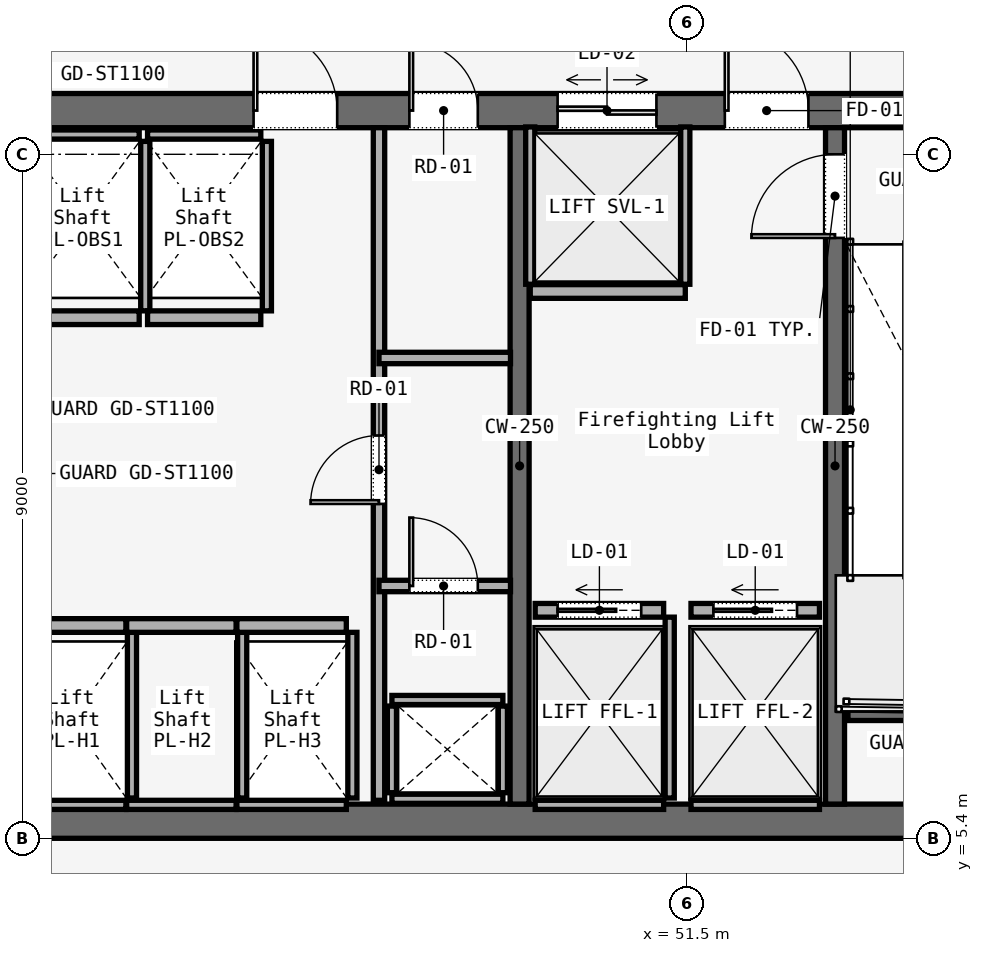
"""IFC4 building model, lengths in metres.
Left out: names, types, materials, properties, quantities, classifications, styles, units other than length and angle.
Written with IfcOpenShell. Run it as: python <this file> out.ifc"""

import sys

from ifc_helpers import new_model, si_unit, direction, frame, frame_2d, origin, place, context, subcontext, project, spatial, rectangle, extrude, element, fill, save


model = new_model("IFC4")
c1 = context("Model", 3, precision=1e-05, world=origin(), true_north=direction((0.0, 1.0)))
c2 = subcontext(c1, "Body", "Model", "MODEL_VIEW")
j1 = project(units=[si_unit("LENGTHUNIT", "METRE"), si_unit("PLANEANGLEUNIT", "RADIAN")], contexts=[c1])
p1 = place(None, origin())
s1 = spatial("IfcSite", under=j1, at=p1, CompositionType="ELEMENT")
p2 = place(p1, origin())
s2 = spatial("IfcBuilding", under=s1, at=p2, CompositionType="ELEMENT")
p3 = place(p2, frame((0.0, 0.0, 18.0)))
s3 = spatial("IfcBuildingStorey", under=s2, at=p3, CompositionType="ELEMENT", Elevation=18.0)
p4 = place(p3, frame((26.45, 14.975, 0.0), z_axis=(0.0, 0.0, 1.0), x_axis=(1.0, 0.0, 0.0)))
e1 = element("IfcWall", 1, at=p4, inside=s3, PredefinedType="SOLIDWALL", context=c2, shape_type="SweptSolid", body=[
    extrude(rectangle(XDim=31.1, YDim=0.45, at=frame_2d((15.55, 0.0))), origin(), (0.0, 0.0, 1.0), 5.7),
])
p5 = place(p4, frame((1.65, 0.0, 0.0)))
e2 = element("IfcOpeningElement", 2, at=p5, cuts=e1, PredefinedType="OPENING", context=c2, shape_type="SweptSolid", body=[
    extrude(rectangle(XDim=1.1, YDim=2.2, at=frame_2d((0.55, 1.1))), frame((0.0, 0.225, 0.0), z_axis=(0.0, -1.0, 0.0), x_axis=(1.0, 0.0, 0.0)), (0.0, 0.0, 1.0), 0.45),
])
p6 = place(p4, frame((13.65, 0.0, 0.0)))
e3 = element("IfcOpeningElement", 3, at=p6, cuts=e1, PredefinedType="OPENING", context=c2, shape_type="SweptSolid", body=[
    extrude(rectangle(XDim=1.1, YDim=2.2, at=frame_2d((0.55, 1.1))), frame((0.0, 0.225, 0.0), z_axis=(0.0, -1.0, 0.0), x_axis=(1.0, 0.0, 0.0)), (0.0, 0.0, 1.0), 0.45),
])
p7 = place(p4, frame((25.55, 0.0, 0.0)))
e4 = element("IfcOpeningElement", 4, at=p7, cuts=e1, PredefinedType="OPENING", context=c2, shape_type="SweptSolid", body=[
    extrude(rectangle(XDim=1.1, YDim=2.2, at=frame_2d((0.55, 1.1))), frame((0.0, 0.225, 0.0), z_axis=(0.0, -1.0, 0.0), x_axis=(1.0, 0.0, 0.0)), (0.0, 0.0, 1.0), 0.45),
])
p8 = place(p4, frame((10.7, 0.0, 0.0)))
e5 = element("IfcOpeningElement", 5, at=p8, cuts=e1, PredefinedType="OPENING", context=c2, shape_type="SweptSolid", body=[
    extrude(rectangle(XDim=1.4, YDim=2.2, at=frame_2d((0.7, 1.1))), frame((0.0, 0.225, 0.0), z_axis=(0.0, -1.0, 0.0), x_axis=(1.0, 0.0, 0.0)), (0.0, 0.0, 1.0), 0.45),
])
p9 = place(p4, frame((19.35, 0.0, 0.0)))
e6 = element("IfcOpeningElement", 6, at=p9, cuts=e1, PredefinedType="OPENING", context=c2, shape_type="SweptSolid", body=[
    extrude(rectangle(XDim=1.1, YDim=2.2, at=frame_2d((0.55, 1.1))), frame((0.0, 0.225, 0.0), z_axis=(0.0, -1.0, 0.0), x_axis=(1.0, 0.0, 0.0)), (0.0, 0.0, 1.0), 0.45),
])
p10 = place(p4, frame((21.4, 0.0, 0.0)))
e7 = element("IfcOpeningElement", 7, at=p10, cuts=e1, PredefinedType="OPENING", context=c2, shape_type="SweptSolid", body=[
    extrude(rectangle(XDim=0.9, YDim=2.1, at=frame_2d((0.45, 1.05))), frame((0.0, 0.225, 0.0), z_axis=(0.0, -1.0, 0.0), x_axis=(1.0, 0.0, 0.0)), (0.0, 0.0, 1.0), 0.45),
])
p11 = place(p4, frame((23.35, 0.0, 0.0)))
e8 = element("IfcOpeningElement", 8, at=p11, cuts=e1, PredefinedType="OPENING", context=c2, shape_type="SweptSolid", body=[
    extrude(rectangle(XDim=1.3, YDim=2.3, at=frame_2d((0.65, 1.15))), frame((0.0, 0.225, 0.0), z_axis=(0.0, -1.0, 0.0), x_axis=(1.0, 0.0, 0.0)), (0.0, 0.0, 1.0), 0.45),
])
p12 = place(p3, frame((26.45, 5.625, 0.0), z_axis=(0.0, 0.0, 1.0), x_axis=(1.0, 0.0, 0.0)))
e9 = element("IfcWall", 9, at=p12, inside=s3, PredefinedType="SOLIDWALL", context=c2, shape_type="SweptSolid", body=[
    extrude(rectangle(XDim=31.1, YDim=0.45, at=frame_2d((15.55, 0.0))), origin(), (0.0, 0.0, 1.0), 5.7),
])
p13 = place(p3, frame((49.3, 5.85, 0.0), z_axis=(0.0, 0.0, 1.0), x_axis=(0.0, 1.0, 0.0)))
e10 = element("IfcWall", 10, at=p13, inside=s3, PredefinedType="SOLIDWALL", context=c2, shape_type="SweptSolid", body=[
    extrude(rectangle(XDim=8.9, YDim=0.25, at=frame_2d((4.45, 0.0))), origin(), (0.0, 0.0, 1.0), 5.7),
])
p14 = place(p3, frame((53.45, 5.85, 0.0), z_axis=(0.0, 0.0, 1.0), x_axis=(0.0, 1.0, 0.0)))
e11 = element("IfcWall", 11, at=p14, inside=s3, PredefinedType="SOLIDWALL", context=c2, shape_type="SweptSolid", body=[
    extrude(rectangle(XDim=8.9, YDim=0.25, at=frame_2d((4.45, 0.0))), origin(), (0.0, 0.0, 1.0), 5.7),
])
p15 = place(p14, frame((7.45, 0.0, 0.0)))
e12 = element("IfcOpeningElement", 12, at=p15, cuts=e11, PredefinedType="OPENING", context=c2, shape_type="SweptSolid", body=[
    extrude(rectangle(XDim=1.1, YDim=2.2, at=frame_2d((0.55, 1.1))), frame((0.0, 0.125, 0.0), z_axis=(0.0, -1.0, 0.0), x_axis=(1.0, 0.0, 0.0)), (0.0, 0.0, 1.0), 0.25),
])
p16 = place(p3, frame((53.62, 7.05, 0.0), z_axis=(0.0, 0.0, 1.0), x_axis=(1.0, 0.0, 0.0)))
e13 = element("IfcWall", 13, at=p16, inside=s3, PredefinedType="SOLIDWALL", context=c2, shape_type="SweptSolid", body=[
    extrude(rectangle(XDim=3.115, YDim=0.2, at=frame_2d((1.558, 0.0))), origin(), (0.0, 0.0, 1.0), 6.0),
])
for number, where, z_axis, x_axis in (
    (14, (47.62, 5.92, 0.0), (0.0, 0.0, 1.0), (1.0, 0.0, 0.0)),
    (15, (47.62, 7.22, 0.0), (0.0, 0.0, 1.0), (1.0, 0.0, 0.0)),
):
    element("IfcWall", number, at=place(p3, frame(where, z_axis=z_axis, x_axis=x_axis)), inside=s3, PredefinedType="SOLIDWALL", context=c2, shape_type="SweptSolid", body=[
        extrude(rectangle(XDim=1.46, YDim=0.12, at=frame_2d((0.73, 0.0))), origin(), (0.0, 0.0, 1.0), 4.47),
    ])
for number, where, z_axis, x_axis in (
    (16, (47.62, 6.0, 0.0), (0.0, 0.0, 1.0), (0.0, 1.0, 0.0)),
    (17, (49.08, 6.0, 0.0), (0.0, 0.0, 1.0), (0.0, 1.0, 0.0)),
):
    element("IfcWall", number, at=place(p3, frame(where, z_axis=z_axis, x_axis=x_axis)), inside=s3, PredefinedType="SOLIDWALL", context=c2, shape_type="SweptSolid", body=[
        extrude(rectangle(XDim=1.14, YDim=0.12, at=frame_2d((0.57, 0.0))), origin(), (0.0, 0.0, 1.0), 4.47),
    ])
p17 = place(p3, frame((47.45, 5.9, 0.0), z_axis=(0.0, 0.0, 1.0), x_axis=(0.0, 1.0, 0.0)))
e18 = element("IfcWall", 18, at=p17, inside=s3, PredefinedType="PARTITIONING", context=c2, shape_type="SweptSolid", body=[
    extrude(rectangle(XDim=8.85, YDim=0.15, at=frame_2d((4.425, 0.0))), origin(), (0.0, 0.0, 1.0), 4.47),
])
p18 = place(p17, frame((3.9, 0.0, 0.0)))
e19 = element("IfcOpeningElement", 19, at=p18, cuts=e18, PredefinedType="OPENING", context=c2, shape_type="SweptSolid", body=[
    extrude(rectangle(XDim=0.9, YDim=2.1, at=frame_2d((0.45, 1.05))), frame((0.0, 0.075, 0.0), z_axis=(0.0, -1.0, 0.0), x_axis=(1.0, 0.0, 0.0)), (0.0, 0.0, 1.0), 0.15),
])
p19 = place(p3, frame((47.45, 8.72, 0.0), z_axis=(0.0, 0.0, 1.0), x_axis=(1.0, 0.0, 0.0)))
e20 = element("IfcWall", 20, at=p19, inside=s3, PredefinedType="PARTITIONING", context=c2, shape_type="SweptSolid", body=[
    extrude(rectangle(XDim=1.73, YDim=0.15, at=frame_2d((0.865, 0.0))), origin(), (0.0, 0.0, 1.0), 4.47),
])
p20 = place(p19, frame((0.4, 0.0, 0.0)))
e21 = element("IfcOpeningElement", 21, at=p20, cuts=e20, PredefinedType="OPENING", context=c2, shape_type="SweptSolid", body=[
    extrude(rectangle(XDim=0.9, YDim=2.1, at=frame_2d((0.45, 1.05))), frame((0.0, 0.075, 0.0), z_axis=(0.0, -1.0, 0.0), x_axis=(1.0, 0.0, 0.0)), (0.0, 0.0, 1.0), 0.15),
])
p21 = place(p3, frame((47.45, 11.72, 0.0), z_axis=(0.0, 0.0, 1.0), x_axis=(1.0, 0.0, 0.0)))
e22 = element("IfcWall", 22, at=p21, inside=s3, PredefinedType="PARTITIONING", context=c2, shape_type="SweptSolid", body=[
    extrude(rectangle(XDim=1.73, YDim=0.15, at=frame_2d((0.865, 0.0))), origin(), (0.0, 0.0, 1.0), 4.47),
])
p22 = place(p3, frame((42.78, 8.2, 0.0), z_axis=(0.0, 0.0, 1.0), x_axis=(1.0, 0.0, 0.0)))
e23 = element("IfcWall", 23, at=p22, inside=s3, PredefinedType="SOLIDWALL", context=c2, shape_type="SweptSolid", body=[
    extrude(rectangle(XDim=1.34, YDim=0.18, at=frame_2d((0.67, 0.0))), origin(), (0.0, 0.0, 1.0), 4.47),
])
p23 = place(p3, frame((42.78, 5.84, 0.0), z_axis=(0.0, 0.0, 1.0), x_axis=(1.0, 0.0, 0.0)))
e24 = element("IfcWall", 24, at=p23, inside=s3, PredefinedType="SOLIDWALL", context=c2, shape_type="SweptSolid", body=[
    extrude(rectangle(XDim=1.34, YDim=0.12, at=frame_2d((0.67, 0.0))), origin(), (0.0, 0.0, 1.0), 4.47),
])
p24 = place(p3, frame((44.2, 5.93, 0.0), z_axis=(0.0, 0.0, 1.0), x_axis=(0.0, 1.0, 0.0)))
e25 = element("IfcWall", 25, at=p24, inside=s3, PredefinedType="SOLIDWALL", context=c2, shape_type="SweptSolid", body=[
    extrude(rectangle(XDim=2.18, YDim=0.12, at=frame_2d((1.09, 0.0))), origin(), (0.0, 0.0, 1.0), 4.47),
])
p25 = place(p3, frame((44.13, 8.2, 0.0), z_axis=(0.0, 0.0, 1.0), x_axis=(1.0, 0.0, 0.0)))
e26 = element("IfcWall", 26, at=p25, inside=s3, PredefinedType="SOLIDWALL", context=c2, shape_type="SweptSolid", body=[
    extrude(rectangle(XDim=1.44, YDim=0.18, at=frame_2d((0.72, 0.0))), origin(), (0.0, 0.0, 1.0), 4.47),
])
p26 = place(p3, frame((44.13, 5.84, 0.0), z_axis=(0.0, 0.0, 1.0), x_axis=(1.0, 0.0, 0.0)))
e27 = element("IfcWall", 27, at=p26, inside=s3, PredefinedType="SOLIDWALL", context=c2, shape_type="SweptSolid", body=[
    extrude(rectangle(XDim=1.44, YDim=0.12, at=frame_2d((0.72, 0.0))), origin(), (0.0, 0.0, 1.0), 4.47),
])
p27 = place(p3, frame((45.65, 5.93, 0.0), z_axis=(0.0, 0.0, 1.0), x_axis=(0.0, 1.0, 0.0)))
e28 = element("IfcWall", 28, at=p27, inside=s3, PredefinedType="SOLIDWALL", context=c2, shape_type="SweptSolid", body=[
    extrude(rectangle(XDim=2.18, YDim=0.12, at=frame_2d((1.09, 0.0))), origin(), (0.0, 0.0, 1.0), 4.47),
])
p28 = place(p3, frame((45.58, 8.2, 0.0), z_axis=(0.0, 0.0, 1.0), x_axis=(1.0, 0.0, 0.0)))
e29 = element("IfcWall", 29, at=p28, inside=s3, PredefinedType="SOLIDWALL", context=c2, shape_type="SweptSolid", body=[
    extrude(rectangle(XDim=1.44, YDim=0.18, at=frame_2d((0.72, 0.0))), origin(), (0.0, 0.0, 1.0), 4.47),
])
p29 = place(p3, frame((45.58, 5.84, 0.0), z_axis=(0.0, 0.0, 1.0), x_axis=(1.0, 0.0, 0.0)))
e30 = element("IfcWall", 30, at=p29, inside=s3, PredefinedType="SOLIDWALL", context=c2, shape_type="SweptSolid", body=[
    extrude(rectangle(XDim=1.44, YDim=0.12, at=frame_2d((0.72, 0.0))), origin(), (0.0, 0.0, 1.0), 4.47),
])
p30 = place(p3, frame((47.1, 5.93, 0.0), z_axis=(0.0, 0.0, 1.0), x_axis=(0.0, 1.0, 0.0)))
e31 = element("IfcWall", 31, at=p30, inside=s3, PredefinedType="SOLIDWALL", context=c2, shape_type="SweptSolid", body=[
    extrude(rectangle(XDim=2.18, YDim=0.12, at=frame_2d((1.09, 0.0))), origin(), (0.0, 0.0, 1.0), 4.47),
])
p31 = place(p3, frame((42.805, 12.25, 0.0), z_axis=(0.0, 0.0, 1.0), x_axis=(1.0, 0.0, 0.0)))
e32 = element("IfcWall", 32, at=p31, inside=s3, PredefinedType="SOLIDWALL", context=c2, shape_type="SweptSolid", body=[
    extrude(rectangle(XDim=1.49, YDim=0.18, at=frame_2d((0.745, 0.0))), origin(), (0.0, 0.0, 1.0), 4.47),
])
p32 = place(p3, frame((42.805, 14.66, 0.0), z_axis=(0.0, 0.0, 1.0), x_axis=(1.0, 0.0, 0.0)))
e33 = element("IfcWall", 33, at=p32, inside=s3, PredefinedType="SOLIDWALL", context=c2, shape_type="SweptSolid", body=[
    extrude(rectangle(XDim=1.49, YDim=0.12, at=frame_2d((0.745, 0.0))), origin(), (0.0, 0.0, 1.0), 4.47),
])
p33 = place(p3, frame((44.375, 12.34, 0.0), z_axis=(0.0, 0.0, 1.0), x_axis=(0.0, 1.0, 0.0)))
e34 = element("IfcWall", 34, at=p33, inside=s3, PredefinedType="SOLIDWALL", context=c2, shape_type="SweptSolid", body=[
    extrude(rectangle(XDim=2.23, YDim=0.12, at=frame_2d((1.115, 0.0))), origin(), (0.0, 0.0, 1.0), 4.47),
])
p34 = place(p3, frame((44.405, 12.25, 0.0), z_axis=(0.0, 0.0, 1.0), x_axis=(1.0, 0.0, 0.0)))
e35 = element("IfcWall", 35, at=p34, inside=s3, PredefinedType="SOLIDWALL", context=c2, shape_type="SweptSolid", body=[
    extrude(rectangle(XDim=1.49, YDim=0.18, at=frame_2d((0.745, 0.0))), origin(), (0.0, 0.0, 1.0), 4.47),
])
p35 = place(p3, frame((44.405, 14.66, 0.0), z_axis=(0.0, 0.0, 1.0), x_axis=(1.0, 0.0, 0.0)))
e36 = element("IfcWall", 36, at=p35, inside=s3, PredefinedType="SOLIDWALL", context=c2, shape_type="SweptSolid", body=[
    extrude(rectangle(XDim=1.49, YDim=0.12, at=frame_2d((0.745, 0.0))), origin(), (0.0, 0.0, 1.0), 4.47),
])
p36 = place(p3, frame((45.975, 12.34, 0.0), z_axis=(0.0, 0.0, 1.0), x_axis=(0.0, 1.0, 0.0)))
e37 = element("IfcWall", 37, at=p36, inside=s3, PredefinedType="SOLIDWALL", context=c2, shape_type="SweptSolid", body=[
    extrude(rectangle(XDim=2.23, YDim=0.12, at=frame_2d((1.115, 0.0))), origin(), (0.0, 0.0, 1.0), 4.47),
])
p37 = place(p3, frame((49.505, 8.4, 0.0), z_axis=(0.0, 0.0, 1.0), x_axis=(1.0, 0.0, 0.0)))
e38 = element("IfcWall", 38, at=p37, inside=s3, PredefinedType="SOLIDWALL", context=c2, shape_type="SweptSolid", body=[
    extrude(rectangle(XDim=1.69, YDim=0.18, at=frame_2d((0.845, 0.0))), origin(), (0.0, 0.0, 1.0), 4.47),
])
p38 = place(p37, frame((0.295, 0.0, 0.0)))
e39 = element("IfcOpeningElement", 39, at=p38, cuts=e38, PredefinedType="OPENING", context=c2, shape_type="SweptSolid", body=[
    extrude(rectangle(XDim=1.1, YDim=2.2, at=frame_2d((0.55, 1.1))), frame((0.0, 0.09, 0.0), z_axis=(0.0, -1.0, 0.0), x_axis=(1.0, 0.0, 0.0)), (0.0, 0.0, 1.0), 0.18),
])
p39 = place(p3, frame((49.505, 5.84, 0.0), z_axis=(0.0, 0.0, 1.0), x_axis=(1.0, 0.0, 0.0)))
e40 = element("IfcWall", 40, at=p39, inside=s3, PredefinedType="SOLIDWALL", context=c2, shape_type="SweptSolid", body=[
    extrude(rectangle(XDim=1.69, YDim=0.12, at=frame_2d((0.845, 0.0))), origin(), (0.0, 0.0, 1.0), 4.47),
])
p40 = place(p3, frame((51.275, 5.93, 0.0), z_axis=(0.0, 0.0, 1.0), x_axis=(0.0, 1.0, 0.0)))
e41 = element("IfcWall", 41, at=p40, inside=s3, PredefinedType="SOLIDWALL", context=c2, shape_type="SweptSolid", body=[
    extrude(rectangle(XDim=2.38, YDim=0.12, at=frame_2d((1.19, 0.0))), origin(), (0.0, 0.0, 1.0), 4.47),
])
p41 = place(p3, frame((51.555, 8.4, 0.0), z_axis=(0.0, 0.0, 1.0), x_axis=(1.0, 0.0, 0.0)))
e42 = element("IfcWall", 42, at=p41, inside=s3, PredefinedType="SOLIDWALL", context=c2, shape_type="SweptSolid", body=[
    extrude(rectangle(XDim=1.69, YDim=0.18, at=frame_2d((0.845, 0.0))), origin(), (0.0, 0.0, 1.0), 4.47),
])
p42 = place(p41, frame((0.295, 0.0, 0.0)))
e43 = element("IfcOpeningElement", 43, at=p42, cuts=e42, PredefinedType="OPENING", context=c2, shape_type="SweptSolid", body=[
    extrude(rectangle(XDim=1.1, YDim=2.2, at=frame_2d((0.55, 1.1))), frame((0.0, 0.09, 0.0), z_axis=(0.0, -1.0, 0.0), x_axis=(1.0, 0.0, 0.0)), (0.0, 0.0, 1.0), 0.18),
])
p43 = place(p3, frame((51.555, 5.84, 0.0), z_axis=(0.0, 0.0, 1.0), x_axis=(1.0, 0.0, 0.0)))
e44 = element("IfcWall", 44, at=p43, inside=s3, PredefinedType="SOLIDWALL", context=c2, shape_type="SweptSolid", body=[
    extrude(rectangle(XDim=1.69, YDim=0.12, at=frame_2d((0.845, 0.0))), origin(), (0.0, 0.0, 1.0), 4.47),
])
p44 = place(p3, frame((49.44, 12.595, 0.0), z_axis=(0.0, 0.0, 1.0), x_axis=(1.0, 0.0, 0.0)))
e45 = element("IfcWall", 45, at=p44, inside=s3, PredefinedType="SOLIDWALL", context=c2, shape_type="SweptSolid", body=[
    extrude(rectangle(XDim=2.04, YDim=0.18, at=frame_2d((1.02, 0.0))), origin(), (0.0, 0.0, 1.0), 4.47),
])
for number, where, z_axis, x_axis in (
    (46, (49.44, 12.69, 0.0), (0.0, 0.0, 1.0), (0.0, 1.0, 0.0)),
    (47, (51.48, 12.69, 0.0), (0.0, 0.0, 1.0), (0.0, 1.0, 0.0)),
):
    element("IfcWall", number, at=place(p3, frame(where, z_axis=z_axis, x_axis=x_axis)), inside=s3, PredefinedType="SOLIDWALL", context=c2, shape_type="SweptSolid", body=[
        extrude(rectangle(XDim=2.07, YDim=0.12, at=frame_2d((1.035, 0.0))), origin(), (0.0, 0.0, 1.0), 4.47),
    ])
p45 = place(p7, origin())
e48 = element("IfcDoor", 48, at=p45, inside=s3, OperationType="SINGLE_SWING_RIGHT", PredefinedType="DOOR", context=c2, shape_type="SweptSolid", body=[
    extrude(rectangle(XDim=1.1, YDim=2.2, at=frame_2d((0.55, 1.1))), frame((0.0, 0.025, 0.0), z_axis=(0.0, -1.0, 0.0), x_axis=(1.0, 0.0, 0.0)), (0.0, 0.0, 1.0), 0.05),
])
fill(e4, e48)
p46 = place(p9, origin())
e49 = element("IfcDoor", 49, at=p46, inside=s3, OperationType="SINGLE_SWING_LEFT", PredefinedType="DOOR", context=c2, shape_type="SweptSolid", body=[
    extrude(rectangle(XDim=1.1, YDim=2.2, at=frame_2d((0.55, 1.1))), frame((0.0, 0.025, 0.0), z_axis=(0.0, -1.0, 0.0), x_axis=(1.0, 0.0, 0.0)), (0.0, 0.0, 1.0), 0.05),
])
fill(e6, e49)
p47 = place(p10, origin())
e50 = element("IfcDoor", 50, at=p47, inside=s3, OperationType="SINGLE_SWING_LEFT", PredefinedType="DOOR", context=c2, shape_type="SweptSolid", body=[
    extrude(rectangle(XDim=0.9, YDim=2.1, at=frame_2d((0.45, 1.05))), frame((0.0, 0.025, 0.0), z_axis=(0.0, -1.0, 0.0), x_axis=(1.0, 0.0, 0.0)), (0.0, 0.0, 1.0), 0.05),
])
fill(e7, e50)
p48 = place(p15, origin())
e51 = element("IfcDoor", 51, at=p48, inside=s3, OperationType="SINGLE_SWING_LEFT", PredefinedType="DOOR", context=c2, shape_type="SweptSolid", body=[
    extrude(rectangle(XDim=1.1, YDim=2.2, at=frame_2d((0.55, 1.1))), frame((0.0, 0.025, 0.0), z_axis=(0.0, -1.0, 0.0), x_axis=(1.0, 0.0, 0.0)), (0.0, 0.0, 1.0), 0.05),
])
fill(e12, e51)
p49 = place(p18, origin())
e52 = element("IfcDoor", 52, at=p49, inside=s3, OperationType="SINGLE_SWING_LEFT", PredefinedType="DOOR", context=c2, shape_type="SweptSolid", body=[
    extrude(rectangle(XDim=0.9, YDim=2.1, at=frame_2d((0.45, 1.05))), frame((0.0, 0.025, 0.0), z_axis=(0.0, -1.0, 0.0), x_axis=(1.0, 0.0, 0.0)), (0.0, 0.0, 1.0), 0.05),
])
fill(e19, e52)
p50 = place(p20, origin())
e53 = element("IfcDoor", 53, at=p50, inside=s3, OperationType="SINGLE_SWING_RIGHT", PredefinedType="DOOR", context=c2, shape_type="SweptSolid", body=[
    extrude(rectangle(XDim=0.9, YDim=2.1, at=frame_2d((0.45, 1.05))), frame((0.0, 0.025, 0.0), z_axis=(0.0, -1.0, 0.0), x_axis=(1.0, 0.0, 0.0)), (0.0, 0.0, 1.0), 0.05),
])
fill(e21, e53)
p51 = place(p38, origin())
e54 = element("IfcDoor", 54, at=p51, inside=s3, OperationType="SLIDING_TO_LEFT", PredefinedType="DOOR", context=c2, shape_type="SweptSolid", body=[
    extrude(rectangle(XDim=1.1, YDim=2.2, at=frame_2d((0.55, 1.1))), frame((0.0, 0.025, 0.0), z_axis=(0.0, -1.0, 0.0), x_axis=(1.0, 0.0, 0.0)), (0.0, 0.0, 1.0), 0.05),
])
fill(e39, e54)
p52 = place(p42, origin())
e55 = element("IfcDoor", 55, at=p52, inside=s3, OperationType="SLIDING_TO_LEFT", PredefinedType="DOOR", context=c2, shape_type="SweptSolid", body=[
    extrude(rectangle(XDim=1.1, YDim=2.2, at=frame_2d((0.55, 1.1))), frame((0.0, 0.025, 0.0), z_axis=(0.0, -1.0, 0.0), x_axis=(1.0, 0.0, 0.0)), (0.0, 0.0, 1.0), 0.05),
])
fill(e43, e55)
p53 = place(p11, origin())
e56 = element("IfcDoor", 56, at=p53, inside=s3, OperationType="DOUBLE_DOOR_SLIDING", PredefinedType="DOOR", context=c2, shape_type="SweptSolid", body=[
    extrude(rectangle(XDim=1.3, YDim=2.3, at=frame_2d((0.65, 1.15))), frame((0.0, 0.025, 0.0), z_axis=(0.0, -1.0, 0.0), x_axis=(1.0, 0.0, 0.0)), (0.0, 0.0, 1.0), 0.05),
])
fill(e8, e56)
save(model, sys.argv[1])
